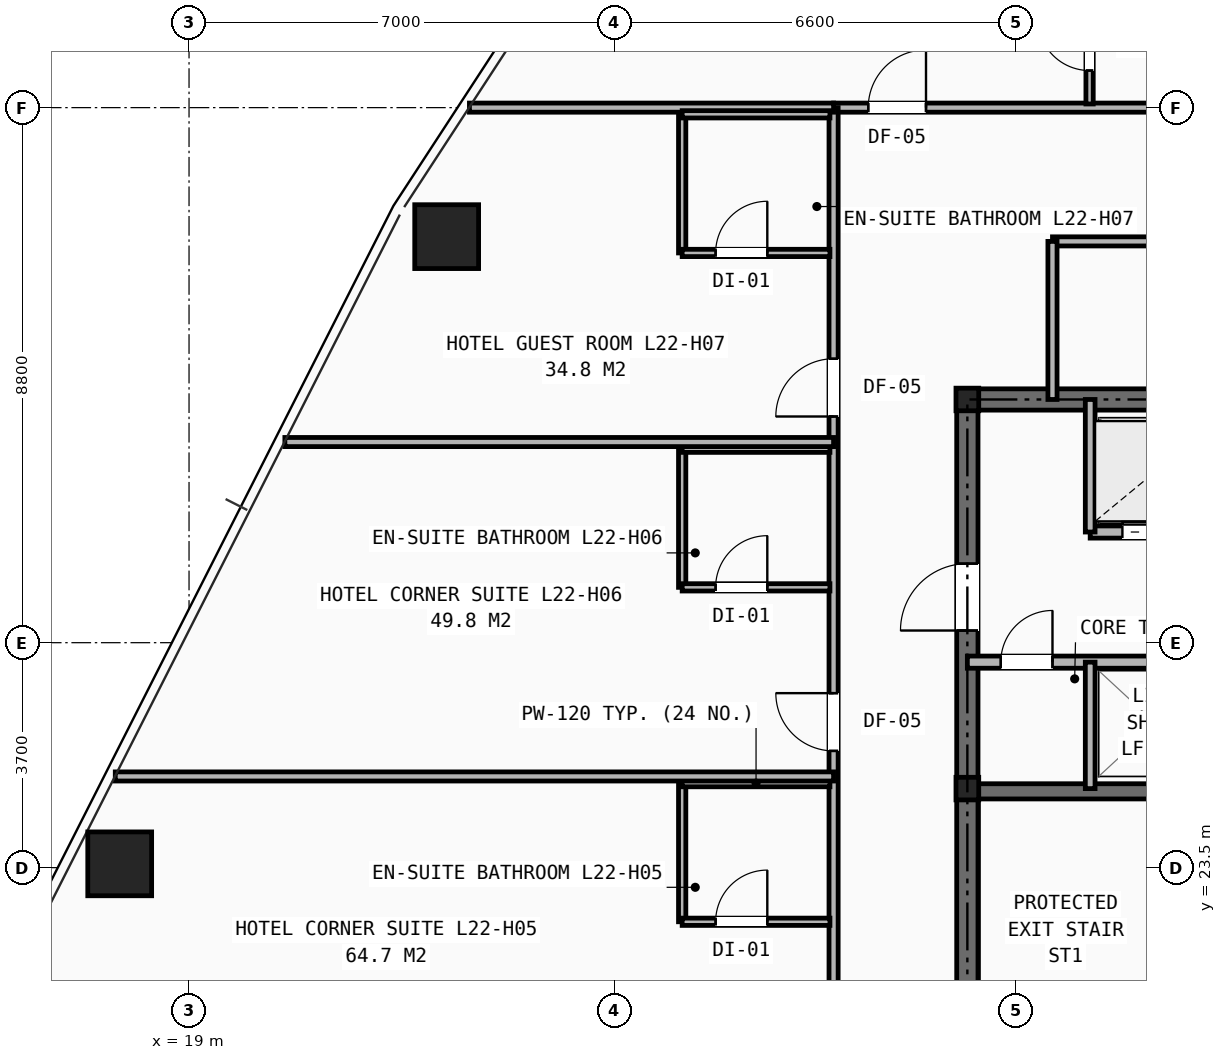
"""IFC4 building model, lengths in metres.
Left out: names, types, materials, properties, quantities, classifications, styles, units other than length and angle.
Written with IfcOpenShell. Run it as: python <this file> out.ifc"""

import sys

from ifc_helpers import new_model, si_unit, direction, frame, frame_2d, origin, origin_2d, place, context, subcontext, project, spatial, rectangle, hollow_rectangle, i_section, extrude, element, fill, save


model = new_model("IFC4")
c1 = context("Model", 3, precision=1e-05, world=origin(), true_north=direction((0.0, 1.0)))
c2 = subcontext(c1, "Body", "Model", "MODEL_VIEW")
j1 = project(units=[si_unit("LENGTHUNIT", "METRE"), si_unit("PLANEANGLEUNIT", "RADIAN")], contexts=[c1])
p1 = place(None, origin())
s1 = spatial("IfcSite", under=j1, at=p1, CompositionType="ELEMENT")
p2 = place(p1, origin())
s2 = spatial("IfcBuilding", under=s1, at=p2, CompositionType="ELEMENT")
p3 = place(p2, frame((0.0, 0.0, 79.8)))
s3 = spatial("IfcBuildingStorey", under=s2, at=p3, CompositionType="ELEMENT", Elevation=79.8)
for number, where, z_axis, x_axis in (
    (1, (31.8, 24.8, 0.0), (0.0, 0.0, 1.0), (1.0, 0.0, 0.0)),
    (2, (31.8, 31.2, 0.0), (0.0, 0.0, 1.0), (1.0, 0.0, 0.0)),
):
    element("IfcColumn", number, at=place(p3, frame(where, z_axis=z_axis, x_axis=x_axis)), inside=s3, PredefinedType="COLUMN", context=c2, shape_type="SweptSolid", body=[
        extrude(i_section(OverallWidth=0.374, OverallDepth=0.372, WebThickness=0.016, FlangeThickness=0.026, at=origin_2d()), origin(), (0.0, 0.0, 1.0), 3.2),
    ])
for number, where, z_axis, x_axis in (
    (3, (23.237, 33.878, 0.0), (0.0, 0.0, 1.0), (1.0, 0.0, 0.0)),
    (4, (17.86, 23.563, 0.0), (0.0, 0.0, 1.0), (1.0, 0.0, 0.0)),
):
    element("IfcColumn", number, at=place(p3, frame(where, z_axis=z_axis, x_axis=x_axis)), inside=s3, PredefinedType="COLUMN", context=c2, shape_type="SweptSolid", body=[
        extrude(hollow_rectangle(XDim=1.05, YDim=1.05, WallThickness=0.07, at=origin_2d()), origin(), (0.0, 0.0, 1.0), 3.2),
    ])
p4 = place(p3, frame((31.8, 31.2, 0.0), z_axis=(0.0, 0.0, 1.0), x_axis=(1.0, 0.0, 0.0)))
e5 = element("IfcWall", 5, at=p4, inside=s3, PredefinedType="SHEAR", context=c2, shape_type="SweptSolid", body=[
    extrude(rectangle(XDim=16.4, YDim=0.35, at=frame_2d((8.2, 0.0))), origin(), (0.0, 0.0, 1.0), 2.97),
])
p5 = place(p3, frame((31.8, 16.4, 0.0), z_axis=(0.0, 0.0, 1.0), x_axis=(0.0, 1.0, 0.0)))
e6 = element("IfcWall", 6, at=p5, inside=s3, PredefinedType="SHEAR", context=c2, shape_type="SweptSolid", body=[
    extrude(rectangle(XDim=14.8, YDim=0.35, at=frame_2d((7.4, 0.0))), origin(), (0.0, 0.0, 1.0), 2.97),
])
p6 = place(p5, frame((11.0, 0.0, 0.0)))
e7 = element("IfcOpeningElement", 7, at=p6, cuts=e6, PredefinedType="OPENING", context=c2, shape_type="SweptSolid", body=[
    extrude(rectangle(XDim=1.1, YDim=2.15, at=frame_2d((0.55, 1.075))), frame((0.0, 0.185, 0.0), z_axis=(0.0, -1.0, 0.0), x_axis=(1.0, 0.0, 0.0)), (0.0, 0.0, 1.0), 0.37),
])
p7 = place(p3, frame((31.8, 24.755, 0.0), z_axis=(0.0, 0.0, 1.0), x_axis=(1.0, 0.0, 0.0)))
e8 = element("IfcWall", 8, at=p7, inside=s3, PredefinedType="SHEAR", context=c2, shape_type="SweptSolid", body=[
    extrude(rectangle(XDim=3.245, YDim=0.25, at=frame_2d((1.623, 0.0))), origin(), (0.0, 0.0, 1.0), 2.97),
])
p8 = place(p3, frame((33.82, 29.02, 0.0), z_axis=(0.0, 0.0, 1.0), x_axis=(1.0, 0.0, 0.0)))
e9 = element("IfcWall", 9, at=p8, inside=s3, PredefinedType="SOLIDWALL", context=c2, shape_type="SweptSolid", body=[
    extrude(rectangle(XDim=14.38, YDim=0.2, at=frame_2d((7.19, 0.0))), origin(), (0.0, 0.0, 1.0), 2.421),
])
p9 = place(p8, frame((0.53, 0.0, 0.0)))
e10 = element("IfcOpeningElement", 10, at=p9, cuts=e9, PredefinedType="OPENING", context=c2, shape_type="SweptSolid", body=[
    extrude(rectangle(XDim=1.1, YDim=2.15, at=frame_2d((0.55, 1.075))), frame((0.0, 0.11, 0.0), z_axis=(0.0, -1.0, 0.0), x_axis=(1.0, 0.0, 0.0)), (0.0, 0.0, 1.0), 0.22),
])
p10 = place(p8, frame((2.69, 0.0, 0.0)))
e11 = element("IfcOpeningElement", 11, at=p10, cuts=e9, PredefinedType="OPENING", context=c2, shape_type="SweptSolid", body=[
    extrude(rectangle(XDim=1.1, YDim=2.15, at=frame_2d((0.55, 1.075))), frame((0.0, 0.11, 0.0), z_axis=(0.0, -1.0, 0.0), x_axis=(1.0, 0.0, 0.0)), (0.0, 0.0, 1.0), 0.22),
])
p11 = place(p8, frame((4.85, 0.0, 0.0)))
e12 = element("IfcOpeningElement", 12, at=p11, cuts=e9, PredefinedType="OPENING", context=c2, shape_type="SweptSolid", body=[
    extrude(rectangle(XDim=1.1, YDim=2.15, at=frame_2d((0.55, 1.075))), frame((0.0, 0.11, 0.0), z_axis=(0.0, -1.0, 0.0), x_axis=(1.0, 0.0, 0.0)), (0.0, 0.0, 1.0), 0.22),
])
p12 = place(p8, frame((7.01, 0.0, 0.0)))
e13 = element("IfcOpeningElement", 13, at=p12, cuts=e9, PredefinedType="OPENING", context=c2, shape_type="SweptSolid", body=[
    extrude(rectangle(XDim=1.1, YDim=2.15, at=frame_2d((0.55, 1.075))), frame((0.0, 0.11, 0.0), z_axis=(0.0, -1.0, 0.0), x_axis=(1.0, 0.0, 0.0)), (0.0, 0.0, 1.0), 0.22),
])
p13 = place(p3, frame((31.8, 26.88, 0.0), z_axis=(0.0, 0.0, 1.0), x_axis=(1.0, 0.0, 0.0)))
e14 = element("IfcWall", 14, at=p13, inside=s3, PredefinedType="SOLIDWALL", context=c2, shape_type="SweptSolid", body=[
    extrude(rectangle(XDim=16.4, YDim=0.2, at=frame_2d((8.2, 0.0))), origin(), (0.0, 0.0, 1.0), 2.421),
])
p14 = place(p13, frame((0.55, 0.0, 0.0)))
e15 = element("IfcOpeningElement", 15, at=p14, cuts=e14, PredefinedType="OPENING", context=c2, shape_type="SweptSolid", body=[
    extrude(rectangle(XDim=0.85, YDim=2.05, at=frame_2d((0.425, 1.025))), frame((0.0, 0.11, 0.0), z_axis=(0.0, -1.0, 0.0), x_axis=(1.0, 0.0, 0.0)), (0.0, 0.0, 1.0), 0.22),
])
p15 = place(p3, frame((33.82, 29.02, 0.0), z_axis=(0.0, 0.0, 1.0), x_axis=(0.0, 1.0, 0.0)))
e16 = element("IfcWall", 16, at=p15, inside=s3, PredefinedType="SOLIDWALL", context=c2, shape_type="SweptSolid", body=[
    extrude(rectangle(XDim=2.18, YDim=0.16, at=frame_2d((1.09, 0.0))), origin(), (0.0, 0.0, 1.0), 2.421),
])
p16 = place(p3, frame((33.82, 24.8, 0.0), z_axis=(0.0, 0.0, 1.0), x_axis=(0.0, 1.0, 0.0)))
e17 = element("IfcWall", 17, at=p16, inside=s3, PredefinedType="SOLIDWALL", context=c2, shape_type="SweptSolid", body=[
    extrude(rectangle(XDim=2.08, YDim=0.16, at=frame_2d((1.04, 0.0))), origin(), (0.0, 0.0, 1.0), 2.97),
])
p17 = place(p3, frame((33.2, 33.8, 0.0), z_axis=(0.0, 0.0, 1.0), x_axis=(1.0, 0.0, 0.0)))
e18 = element("IfcWall", 18, at=p17, inside=s3, PredefinedType="PARTITIONING", context=c2, shape_type="SweptSolid", body=[
    extrude(rectangle(XDim=13.0, YDim=0.15, at=frame_2d((6.5, 0.0))), origin(), (0.0, 0.0, 1.0), 2.97),
])
p18 = place(p17, frame((1.7, 0.0, 0.0)))
e19 = element("IfcOpeningElement", 19, at=p18, cuts=e18, PredefinedType="OPENING", context=c2, shape_type="SweptSolid", body=[
    extrude(rectangle(XDim=0.9, YDim=2.1, at=frame_2d((0.45, 1.05))), frame((0.0, 0.085, 0.0), z_axis=(0.0, -1.0, 0.0), x_axis=(1.0, 0.0, 0.0)), (0.0, 0.0, 1.0), 0.17),
])
p19 = place(p17, frame((6.0, 0.0, 0.0)))
e20 = element("IfcOpeningElement", 20, at=p19, cuts=e18, PredefinedType="OPENING", context=c2, shape_type="SweptSolid", body=[
    extrude(rectangle(XDim=0.9, YDim=2.1, at=frame_2d((0.45, 1.05))), frame((0.0, 0.085, 0.0), z_axis=(0.0, -1.0, 0.0), x_axis=(1.0, 0.0, 0.0)), (0.0, 0.0, 1.0), 0.17),
])
p20 = place(p17, frame((10.35, 0.0, 0.0)))
e21 = element("IfcOpeningElement", 21, at=p20, cuts=e18, PredefinedType="OPENING", context=c2, shape_type="SweptSolid", body=[
    extrude(rectangle(XDim=0.9, YDim=2.1, at=frame_2d((0.45, 1.05))), frame((0.0, 0.085, 0.0), z_axis=(0.0, -1.0, 0.0), x_axis=(1.0, 0.0, 0.0)), (0.0, 0.0, 1.0), 0.17),
])
p21 = place(p3, frame((33.2, 31.2, 0.0), z_axis=(0.0, 0.0, 1.0), x_axis=(0.0, 1.0, 0.0)))
e22 = element("IfcWall", 22, at=p21, inside=s3, PredefinedType="PARTITIONING", context=c2, shape_type="SweptSolid", body=[
    extrude(rectangle(XDim=2.6, YDim=0.15, at=frame_2d((1.3, 0.0))), origin(), (0.0, 0.0, 1.0), 2.421),
])
p22 = place(p3, frame((29.6, 36.0, 0.0), z_axis=(0.0, 0.0, 1.0), x_axis=(1.0, 0.0, 0.0)))
e23 = element("IfcWall", 23, at=p22, inside=s3, PredefinedType="PARTITIONING", context=c2, shape_type="SweptSolid", body=[
    extrude(rectangle(XDim=9.65, YDim=0.15, at=frame_2d((4.825, 0.0))), origin(), (0.0, 0.0, 1.0), 2.97),
])
p23 = place(p22, frame((0.57, 0.0, 0.0)))
e24 = element("IfcOpeningElement", 24, at=p23, cuts=e23, PredefinedType="OPENING", context=c2, shape_type="SweptSolid", body=[
    extrude(rectangle(XDim=0.95, YDim=2.1, at=frame_2d((0.475, 1.05))), frame((0.0, 0.085, 0.0), z_axis=(0.0, -1.0, 0.0), x_axis=(1.0, 0.0, 0.0)), (0.0, 0.0, 1.0), 0.17),
])
p24 = place(p22, frame((7.02, 0.0, 0.0)))
e25 = element("IfcOpeningElement", 25, at=p24, cuts=e23, PredefinedType="OPENING", context=c2, shape_type="SweptSolid", body=[
    extrude(rectangle(XDim=0.95, YDim=2.1, at=frame_2d((0.475, 1.05))), frame((0.0, 0.085, 0.0), z_axis=(0.0, -1.0, 0.0), x_axis=(1.0, 0.0, 0.0)), (0.0, 0.0, 1.0), 0.17),
])
p25 = place(p3, frame((29.6, 14.1, 0.0), z_axis=(0.0, 0.0, 1.0), x_axis=(0.0, 1.0, 0.0)))
e26 = element("IfcWall", 26, at=p25, inside=s3, PredefinedType="PARTITIONING", context=c2, shape_type="SweptSolid", body=[
    extrude(rectangle(XDim=21.9, YDim=0.15, at=frame_2d((10.95, 0.0))), origin(), (0.0, 0.0, 1.0), 2.181),
])
p26 = place(p25, frame((0.42, 0.0, 0.0)))
e27 = element("IfcOpeningElement", 27, at=p26, cuts=e26, PredefinedType="OPENING", context=c2, shape_type="SweptSolid", body=[
    extrude(rectangle(XDim=0.95, YDim=2.1, at=frame_2d((0.475, 1.05))), frame((0.0, 0.085, 0.0), z_axis=(0.0, -1.0, 0.0), x_axis=(1.0, 0.0, 0.0)), (0.0, 0.0, 1.0), 0.17),
])
p27 = place(p25, frame((5.82, 0.0, 0.0)))
e28 = element("IfcOpeningElement", 28, at=p27, cuts=e26, PredefinedType="OPENING", context=c2, shape_type="SweptSolid", body=[
    extrude(rectangle(XDim=0.95, YDim=2.1, at=frame_2d((0.475, 1.05))), frame((0.0, 0.085, 0.0), z_axis=(0.0, -1.0, 0.0), x_axis=(1.0, 0.0, 0.0)), (0.0, 0.0, 1.0), 0.17),
])
p28 = place(p25, frame((11.32, 0.0, 0.0)))
e29 = element("IfcOpeningElement", 29, at=p28, cuts=e26, PredefinedType="OPENING", context=c2, shape_type="SweptSolid", body=[
    extrude(rectangle(XDim=0.95, YDim=2.1, at=frame_2d((0.475, 1.05))), frame((0.0, 0.085, 0.0), z_axis=(0.0, -1.0, 0.0), x_axis=(1.0, 0.0, 0.0)), (0.0, 0.0, 1.0), 0.17),
])
p29 = place(p25, frame((16.82, 0.0, 0.0)))
e30 = element("IfcOpeningElement", 30, at=p29, cuts=e26, PredefinedType="OPENING", context=c2, shape_type="SweptSolid", body=[
    extrude(rectangle(XDim=0.95, YDim=2.1, at=frame_2d((0.475, 1.05))), frame((0.0, 0.085, 0.0), z_axis=(0.0, -1.0, 0.0), x_axis=(1.0, 0.0, 0.0)), (0.0, 0.0, 1.0), 0.17),
])
p30 = place(p3, frame((23.611, 36.0, 0.0), z_axis=(0.0, 0.0, 1.0), x_axis=(1.0, 0.0, 0.0)))
e31 = element("IfcWall", 31, at=p30, inside=s3, PredefinedType="PARTITIONING", context=c2, shape_type="SweptSolid", body=[
    extrude(rectangle(XDim=5.989, YDim=0.15, at=frame_2d((2.994, 0.0))), origin(), (0.0, 0.0, 1.0), 2.258),
])
p31 = place(p3, frame((27.11, 22.61, 0.0), z_axis=(0.0, 0.0, 1.0), x_axis=(0.0, 1.0, 0.0)))
e32 = element("IfcWall", 32, at=p31, inside=s3, PredefinedType="PARTITIONING", context=c2, shape_type="SweptSolid", body=[
    extrude(rectangle(XDim=2.28, YDim=0.12, at=frame_2d((1.14, 0.0))), origin(), (0.0, 0.0, 1.0), 2.97),
])
p32 = place(p3, frame((27.11, 22.61, 0.0), z_axis=(0.0, 0.0, 1.0), x_axis=(1.0, 0.0, 0.0)))
e33 = element("IfcWall", 33, at=p32, inside=s3, PredefinedType="PARTITIONING", context=c2, shape_type="SweptSolid", body=[
    extrude(rectangle(XDim=2.43, YDim=0.12, at=frame_2d((1.215, 0.0))), origin(), (0.0, 0.0, 1.0), 2.97),
])
p33 = place(p32, frame((0.55, 0.0, 0.0)))
e34 = element("IfcOpeningElement", 34, at=p33, cuts=e33, PredefinedType="OPENING", context=c2, shape_type="SweptSolid", body=[
    extrude(rectangle(XDim=0.85, YDim=2.05, at=frame_2d((0.425, 1.025))), frame((0.0, 0.07, 0.0), z_axis=(0.0, -1.0, 0.0), x_axis=(1.0, 0.0, 0.0)), (0.0, 0.0, 1.0), 0.14),
])
p34 = place(p3, frame((27.11, 24.89, 0.0), z_axis=(0.0, 0.0, 1.0), x_axis=(1.0, 0.0, 0.0)))
e35 = element("IfcWall", 35, at=p34, inside=s3, PredefinedType="PARTITIONING", context=c2, shape_type="SweptSolid", body=[
    extrude(rectangle(XDim=2.43, YDim=0.12, at=frame_2d((1.215, 0.0))), origin(), (0.0, 0.0, 1.0), 2.97),
])
p35 = place(p3, frame((17.787, 25.0, 0.0), z_axis=(0.0, 0.0, 1.0), x_axis=(1.0, 0.0, 0.0)))
e36 = element("IfcWall", 36, at=p35, inside=s3, PredefinedType="PARTITIONING", context=c2, shape_type="SweptSolid", body=[
    extrude(rectangle(XDim=11.813, YDim=0.15, at=frame_2d((5.907, 0.0))), origin(), (0.0, 0.0, 1.0), 2.258),
])
p36 = place(p3, frame((27.11, 28.11, 0.0), z_axis=(0.0, 0.0, 1.0), x_axis=(0.0, 1.0, 0.0)))
e37 = element("IfcWall", 37, at=p36, inside=s3, PredefinedType="PARTITIONING", context=c2, shape_type="SweptSolid", body=[
    extrude(rectangle(XDim=2.28, YDim=0.12, at=frame_2d((1.14, 0.0))), origin(), (0.0, 0.0, 1.0), 2.97),
])
p37 = place(p3, frame((27.11, 28.11, 0.0), z_axis=(0.0, 0.0, 1.0), x_axis=(1.0, 0.0, 0.0)))
e38 = element("IfcWall", 38, at=p37, inside=s3, PredefinedType="PARTITIONING", context=c2, shape_type="SweptSolid", body=[
    extrude(rectangle(XDim=2.43, YDim=0.12, at=frame_2d((1.215, 0.0))), origin(), (0.0, 0.0, 1.0), 2.97),
])
p38 = place(p37, frame((0.55, 0.0, 0.0)))
e39 = element("IfcOpeningElement", 39, at=p38, cuts=e38, PredefinedType="OPENING", context=c2, shape_type="SweptSolid", body=[
    extrude(rectangle(XDim=0.85, YDim=2.05, at=frame_2d((0.425, 1.025))), frame((0.0, 0.07, 0.0), z_axis=(0.0, -1.0, 0.0), x_axis=(1.0, 0.0, 0.0)), (0.0, 0.0, 1.0), 0.14),
])
p39 = place(p3, frame((27.11, 30.39, 0.0), z_axis=(0.0, 0.0, 1.0), x_axis=(1.0, 0.0, 0.0)))
e40 = element("IfcWall", 40, at=p39, inside=s3, PredefinedType="PARTITIONING", context=c2, shape_type="SweptSolid", body=[
    extrude(rectangle(XDim=2.43, YDim=0.12, at=frame_2d((1.215, 0.0))), origin(), (0.0, 0.0, 1.0), 2.97),
])
p40 = place(p3, frame((20.576, 30.5, 0.0), z_axis=(0.0, 0.0, 1.0), x_axis=(1.0, 0.0, 0.0)))
e41 = element("IfcWall", 41, at=p40, inside=s3, PredefinedType="PARTITIONING", context=c2, shape_type="SweptSolid", body=[
    extrude(rectangle(XDim=9.024, YDim=0.15, at=frame_2d((4.512, 0.0))), origin(), (0.0, 0.0, 1.0), 2.258),
])
p41 = place(p3, frame((27.11, 33.61, 0.0), z_axis=(0.0, 0.0, 1.0), x_axis=(0.0, 1.0, 0.0)))
e42 = element("IfcWall", 42, at=p41, inside=s3, PredefinedType="PARTITIONING", context=c2, shape_type="SweptSolid", body=[
    extrude(rectangle(XDim=2.28, YDim=0.12, at=frame_2d((1.14, 0.0))), origin(), (0.0, 0.0, 1.0), 2.503),
])
p42 = place(p3, frame((27.11, 33.61, 0.0), z_axis=(0.0, 0.0, 1.0), x_axis=(1.0, 0.0, 0.0)))
e43 = element("IfcWall", 43, at=p42, inside=s3, PredefinedType="PARTITIONING", context=c2, shape_type="SweptSolid", body=[
    extrude(rectangle(XDim=2.43, YDim=0.12, at=frame_2d((1.215, 0.0))), origin(), (0.0, 0.0, 1.0), 2.503),
])
p43 = place(p42, frame((0.55, 0.0, 0.0)))
e44 = element("IfcOpeningElement", 44, at=p43, cuts=e43, PredefinedType="OPENING", context=c2, shape_type="SweptSolid", body=[
    extrude(rectangle(XDim=0.85, YDim=2.05, at=frame_2d((0.425, 1.025))), frame((0.0, 0.07, 0.0), z_axis=(0.0, -1.0, 0.0), x_axis=(1.0, 0.0, 0.0)), (0.0, 0.0, 1.0), 0.14),
])
p44 = place(p3, frame((27.11, 35.89, 0.0), z_axis=(0.0, 0.0, 1.0), x_axis=(1.0, 0.0, 0.0)))
e45 = element("IfcWall", 45, at=p44, inside=s3, PredefinedType="PARTITIONING", context=c2, shape_type="SweptSolid", body=[
    extrude(rectangle(XDim=2.43, YDim=0.12, at=frame_2d((1.215, 0.0))), origin(), (0.0, 0.0, 1.0), 2.503),
])
p45 = place(p3, frame((33.81, 36.06, 0.0), z_axis=(0.0, 0.0, 1.0), x_axis=(0.0, 1.0, 0.0)))
e46 = element("IfcWall", 46, at=p45, inside=s3, PredefinedType="PARTITIONING", context=c2, shape_type="SweptSolid", body=[
    extrude(rectangle(XDim=2.43, YDim=0.12, at=frame_2d((1.215, 0.0))), origin(), (0.0, 0.0, 1.0), 2.97),
])
p46 = place(p45, frame((0.55, 0.0, 0.0)))
e47 = element("IfcOpeningElement", 47, at=p46, cuts=e46, PredefinedType="OPENING", context=c2, shape_type="SweptSolid", body=[
    extrude(rectangle(XDim=0.85, YDim=2.05, at=frame_2d((0.425, 1.025))), frame((0.0, 0.07, 0.0), z_axis=(0.0, -1.0, 0.0), x_axis=(1.0, 0.0, 0.0)), (0.0, 0.0, 1.0), 0.14),
])
p47 = place(p14, origin())
e48 = element("IfcDoor", 48, at=p47, inside=s3, OperationType="SINGLE_SWING_RIGHT", PredefinedType="DOOR", context=c2, shape_type="SweptSolid", body=[
    extrude(rectangle(XDim=0.85, YDim=2.05, at=frame_2d((0.425, 1.025))), frame((0.0, 0.025, 0.0), z_axis=(0.0, -1.0, 0.0), x_axis=(1.0, 0.0, 0.0)), (0.0, 0.0, 1.0), 0.05),
])
fill(e15, e48)
p48 = place(p6, origin())
e49 = element("IfcDoor", 49, at=p48, inside=s3, OperationType="SINGLE_SWING_LEFT", PredefinedType="DOOR", context=c2, shape_type="SweptSolid", body=[
    extrude(rectangle(XDim=1.1, YDim=2.15, at=frame_2d((0.55, 1.075))), frame((0.0, 0.025, 0.0), z_axis=(0.0, -1.0, 0.0), x_axis=(1.0, 0.0, 0.0)), (0.0, 0.0, 1.0), 0.05),
])
fill(e7, e49)
p49 = place(p9, origin())
e50 = element("IfcDoor", 50, at=p49, inside=s3, OperationType="DOUBLE_DOOR_SLIDING", PredefinedType="DOOR", context=c2, shape_type="SweptSolid", body=[
    extrude(rectangle(XDim=1.1, YDim=2.15, at=frame_2d((0.55, 1.075))), frame((0.0, 0.025, 0.0), z_axis=(0.0, -1.0, 0.0), x_axis=(1.0, 0.0, 0.0)), (0.0, 0.0, 1.0), 0.05),
])
fill(e10, e50)
p50 = place(p33, origin())
e51 = element("IfcDoor", 51, at=p50, inside=s3, OperationType="SINGLE_SWING_RIGHT", PredefinedType="DOOR", context=c2, shape_type="SweptSolid", body=[
    extrude(rectangle(XDim=0.85, YDim=2.05, at=frame_2d((0.425, 1.025))), frame((0.0, 0.025, 0.0), z_axis=(0.0, -1.0, 0.0), x_axis=(1.0, 0.0, 0.0)), (0.0, 0.0, 1.0), 0.05),
])
fill(e34, e51)
p51 = place(p28, origin())
e52 = element("IfcDoor", 52, at=p51, inside=s3, OperationType="SINGLE_SWING_RIGHT", PredefinedType="DOOR", context=c2, shape_type="SweptSolid", body=[
    extrude(rectangle(XDim=0.95, YDim=2.1, at=frame_2d((0.475, 1.05))), frame((0.0, 0.025, 0.0), z_axis=(0.0, -1.0, 0.0), x_axis=(1.0, 0.0, 0.0)), (0.0, 0.0, 1.0), 0.05),
])
fill(e29, e52)
p52 = place(p38, origin())
e53 = element("IfcDoor", 53, at=p52, inside=s3, OperationType="SINGLE_SWING_RIGHT", PredefinedType="DOOR", context=c2, shape_type="SweptSolid", body=[
    extrude(rectangle(XDim=0.85, YDim=2.05, at=frame_2d((0.425, 1.025))), frame((0.0, 0.025, 0.0), z_axis=(0.0, -1.0, 0.0), x_axis=(1.0, 0.0, 0.0)), (0.0, 0.0, 1.0), 0.05),
])
fill(e39, e53)
p53 = place(p29, origin())
e54 = element("IfcDoor", 54, at=p53, inside=s3, OperationType="SINGLE_SWING_LEFT", PredefinedType="DOOR", context=c2, shape_type="SweptSolid", body=[
    extrude(rectangle(XDim=0.95, YDim=2.1, at=frame_2d((0.475, 1.05))), frame((0.0, 0.025, 0.0), z_axis=(0.0, -1.0, 0.0), x_axis=(1.0, 0.0, 0.0)), (0.0, 0.0, 1.0), 0.05),
])
fill(e30, e54)
p54 = place(p43, origin())
e55 = element("IfcDoor", 55, at=p54, inside=s3, OperationType="SINGLE_SWING_RIGHT", PredefinedType="DOOR", context=c2, shape_type="SweptSolid", body=[
    extrude(rectangle(XDim=0.85, YDim=2.05, at=frame_2d((0.425, 1.025))), frame((0.0, 0.025, 0.0), z_axis=(0.0, -1.0, 0.0), x_axis=(1.0, 0.0, 0.0)), (0.0, 0.0, 1.0), 0.05),
])
fill(e44, e55)
p55 = place(p23, origin())
e56 = element("IfcDoor", 56, at=p55, inside=s3, OperationType="SINGLE_SWING_RIGHT", PredefinedType="DOOR", context=c2, shape_type="SweptSolid", body=[
    extrude(rectangle(XDim=0.95, YDim=2.1, at=frame_2d((0.475, 1.05))), frame((0.0, 0.025, 0.0), z_axis=(0.0, -1.0, 0.0), x_axis=(1.0, 0.0, 0.0)), (0.0, 0.0, 1.0), 0.05),
])
fill(e24, e56)
p56 = place(p46, origin())
e57 = element("IfcDoor", 57, at=p56, inside=s3, OperationType="SINGLE_SWING_RIGHT", PredefinedType="DOOR", context=c2, shape_type="SweptSolid", body=[
    extrude(rectangle(XDim=0.85, YDim=2.05, at=frame_2d((0.425, 1.025))), frame((0.0, 0.025, 0.0), z_axis=(0.0, -1.0, 0.0), x_axis=(1.0, 0.0, 0.0)), (0.0, 0.0, 1.0), 0.05),
])
fill(e47, e57)
save(model, sys.argv[1])
